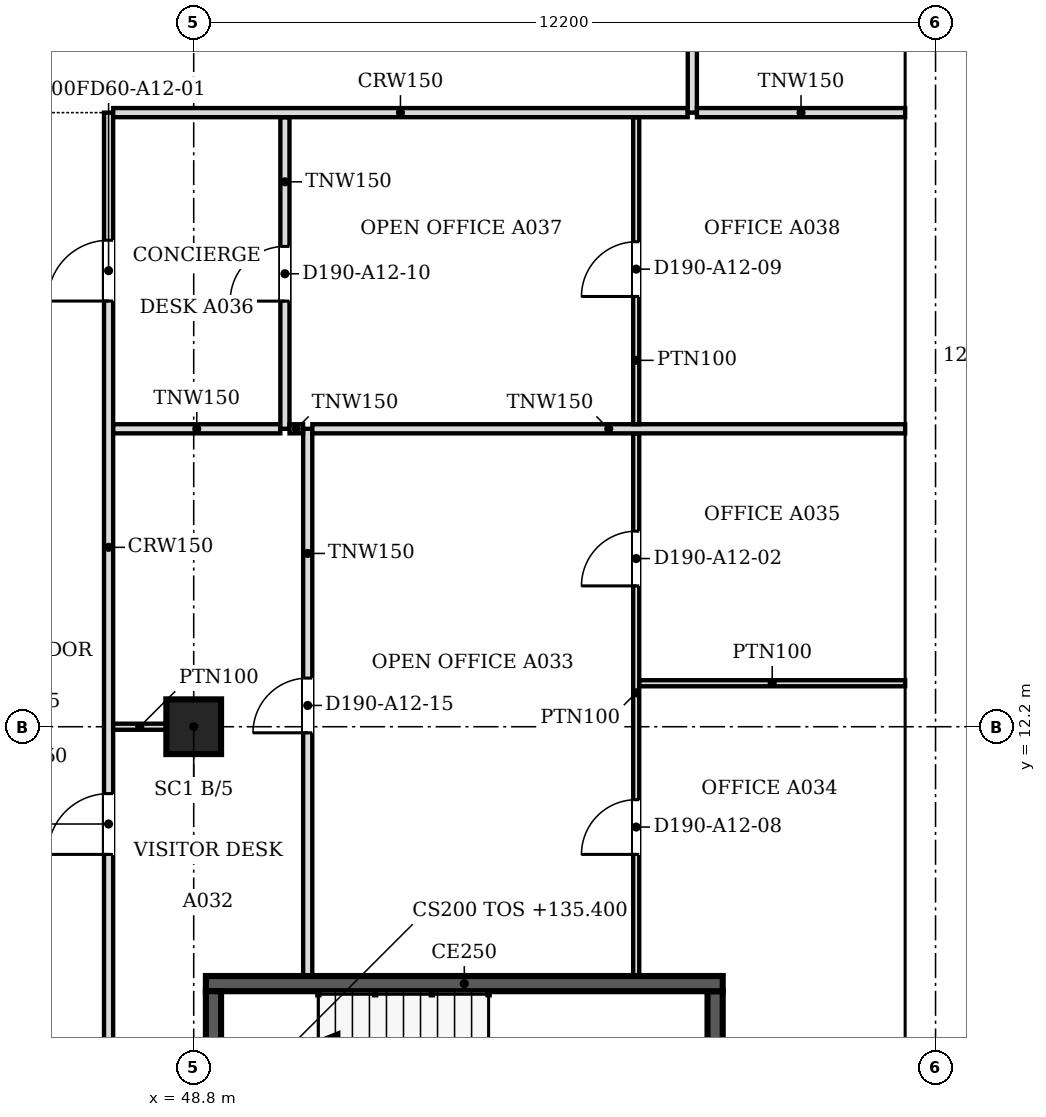
"""IFC4 building model, lengths in metres.
Left out: names, types, materials, properties, quantities, classifications, styles, units other than length and angle.
Written with IfcOpenShell. Run it as: python <this file> out.ifc"""

import sys

from ifc_helpers import new_model, si_unit, direction, frame, frame_2d, origin, origin_2d, place, context, subcontext, project, spatial, polyline, rectangle, outline, extrude, faceted_brep, source, transform, mapped, element, fill, save


model = new_model("IFC4")
c1 = context("Model", 3, precision=1e-05, world=origin(), true_north=direction((0.0, 1.0)))
c2 = subcontext(c1, "Body", "Model", "MODEL_VIEW")
j1 = project(units=[si_unit("LENGTHUNIT", "METRE"), si_unit("PLANEANGLEUNIT", "RADIAN")], contexts=[c1])
p1 = place(None, origin())
s1 = spatial("IfcSite", under=j1, at=p1, CompositionType="ELEMENT")
p2 = place(p1, origin())
s2 = spatial("IfcBuilding", under=s1, at=p2, CompositionType="ELEMENT")
p3 = place(p2, frame((0.0, 0.0, 135.4)))
s3 = spatial("IfcBuildingStorey", under=s2, at=p3, CompositionType="ELEMENT", Elevation=135.4)
p4 = place(p3, frame((48.8, 12.2, 0.0), z_axis=(0.0, 0.0, 1.0), x_axis=(1.0, 0.0, 0.0)))
e1 = element("IfcColumn", 1, at=p4, inside=s3, PredefinedType="COLUMN", context=c2, shape_type="SweptSolid", body=[
    extrude(rectangle(XDim=0.9, YDim=0.9, at=origin_2d()), origin(), (0.0, 0.0, 1.0), 3.6),
])
m1 = source(origin(), c2, "Body", "Brep", [
    faceted_brep([(3.003, -0.25, 0.0), (6.053, -0.25, 3.8), (3.003, -0.25, 7.6), (0.0, -0.25, 3.8), (0.047, 0.25, 3.859), (3.003, 0.25, 7.6), (6.053, 0.25, 3.8), (3.003, 0.25, 0.0), (0.047, 0.25, 3.741), (0.0, 0.0, 3.8)], [[[0, 1, 2, 3]], [[4, 5, 6, 7, 8]], [[7, 6, 1, 0]], [[6, 5, 2, 1]], [[5, 4, 9, 3, 2]], [[8, 7, 0, 3, 9]], [[8, 9, 4]]]),
])
p5 = place(p3, frame((60.75, 6.146, -3.8), z_axis=(0.0, 0.0, 1.0), x_axis=(0.0, 1.0, 0.0)))
e2 = element("IfcWall", 2, at=p5, inside=s3, PredefinedType="SOLIDWALL", context=c2, shape_type="MappedRepresentation", body=[
    mapped(m1, transform((0.0, 0.0, 0.0), scale=1.0)),
])
m2 = source(origin(), c2, "Body", "SweptSolid", [
    extrude(outline(polyline([(3.005, 0.401), (5.733, 3.8), (3.005, 7.199), (0.319, 3.8), (3.005, 0.401)])), frame((0.0, 0.26, 0.0), z_axis=(0.0, -1.0, 0.0), x_axis=(1.0, 0.0, 0.0)), (0.0, 0.0, 1.0), 0.52),
])
p6 = place(p5, origin())
e3 = element("IfcOpeningElement", 3, at=p6, cuts=e2, PredefinedType="OPENING", context=c2, shape_type="MappedRepresentation", body=[
    mapped(m2, transform((0.0, 0.0, 0.0), scale=1.0)),
])
m3 = source(origin(), c2, "Body", "SweptSolid", [
    extrude(outline(polyline([(3.05, 0.0), (6.1, 3.8), (3.05, 7.6), (0.0, 3.8), (3.05, 0.0)])), frame((0.0, 0.25, 0.0), z_axis=(0.0, -1.0, 0.0), x_axis=(1.0, 0.0, 0.0)), (0.0, 0.0, 1.0), 0.5),
])
p7 = place(p3, frame((60.75, 12.2, -3.8), z_axis=(0.0, 0.0, 1.0), x_axis=(0.0, 1.0, 0.0)))
e4 = element("IfcWall", 4, at=p7, inside=s3, PredefinedType="SOLIDWALL", context=c2, shape_type="MappedRepresentation", body=[
    mapped(m3, transform((0.0, 0.0, 0.0), scale=1.0)),
])
m4 = source(origin(), c2, "Body", "SweptSolid", [
    extrude(outline(polyline([(3.05, 0.399), (5.78, 3.8), (3.05, 7.2), (0.321, 3.8), (3.05, 0.399)])), frame((0.0, 0.26, 0.0), z_axis=(0.0, -1.0, 0.0), x_axis=(1.0, 0.0, 0.0)), (0.0, 0.0, 1.0), 0.52),
])
p8 = place(p7, origin())
e5 = element("IfcOpeningElement", 5, at=p8, cuts=e4, PredefinedType="OPENING", context=c2, shape_type="MappedRepresentation", body=[
    mapped(m4, transform((0.0, 0.0, 0.0), scale=1.0)),
])
m5 = source(origin(), c2, "Body", "Brep", [
    faceted_brep([(3.05, -0.25, 0.0), (6.1, -0.25, 3.8), (6.1, -0.25, 3.8), (3.05, -0.25, 7.6), (0.0, -0.25, 3.8), (0.0, 0.25, 3.8), (3.05, 0.25, 7.6), (6.1, 0.25, 3.8), (6.1, 0.25, 3.8), (3.05, 0.25, 0.0)], [[[0, 1, 2, 3, 4]], [[5, 6, 7, 8, 9]], [[9, 8, 1, 0]], [[7, 6, 3, 2]], [[6, 5, 4, 3]], [[5, 9, 0, 4]], [[1, 8, 7, 2]]]),
])
p9 = place(p3, frame((60.75, 18.3, -3.8), z_axis=(0.0, 0.0, 1.0), x_axis=(0.0, 1.0, 0.0)))
e6 = element("IfcWall", 6, at=p9, inside=s3, PredefinedType="SOLIDWALL", context=c2, shape_type="MappedRepresentation", body=[
    mapped(m5, transform((0.0, 0.0, 0.0), scale=1.0)),
])
p10 = place(p9, origin())
e7 = element("IfcOpeningElement", 7, at=p10, cuts=e6, PredefinedType="OPENING", context=c2, shape_type="MappedRepresentation", body=[
    mapped(m4, transform((0.0, 0.0, 0.0), scale=1.0)),
])
p11 = place(p2, frame((0.0, 0.0, 139.2)))
s4 = spatial("IfcBuildingStorey", under=s2, at=p11, CompositionType="ELEMENT", Elevation=139.2)
m6 = source(origin(), c2, "Body", "Brep", [
    faceted_brep([(0.047, -0.25, 0.0), (3.05, -0.25, 3.8), (0.047, -0.25, 7.6), (0.0, -0.25, 7.54), (0.0, -0.25, 0.06), (0.093, 0.25, 7.541), (3.05, 0.25, 3.8), (0.093, 0.25, 0.059), (0.047, 0.0, 0.0), (0.047, 0.0, 7.6)], [[[0, 1, 2, 3, 4]], [[5, 6, 7]], [[7, 6, 1, 0, 8]], [[6, 5, 9, 2, 1]], [[3, 2, 9]], [[8, 0, 4]], [[7, 8, 4, 3, 9, 5]]]),
])
p12 = place(p11, frame((60.75, 6.1, -3.8), z_axis=(0.0, 0.0, 1.0), x_axis=(0.0, 1.0, 0.0)))
e8 = element("IfcWall", 8, at=p12, inside=s4, PredefinedType="SOLIDWALL", context=c2, shape_type="MappedRepresentation", body=[
    mapped(m6, transform((0.0, 0.0, 0.0), scale=1.0)),
])
m7 = source(origin(), c2, "Body", "SweptSolid", [
    extrude(outline(polyline([(0.247, 0.656), (2.731, 3.8), (0.247, 6.944), (0.247, 0.656)])), frame((0.0, 0.26, 0.0), z_axis=(0.0, -1.0, 0.0), x_axis=(1.0, 0.0, 0.0)), (0.0, 0.0, 1.0), 0.52),
])
p13 = place(p12, origin())
e9 = element("IfcOpeningElement", 9, at=p13, cuts=e8, PredefinedType="OPENING", context=c2, shape_type="MappedRepresentation", body=[
    mapped(m7, transform((0.0, 0.0, 0.0), scale=1.0)),
])
m8 = source(origin(), c2, "Body", "SweptSolid", [
    extrude(outline(polyline([(3.05, 0.0), (6.1, 3.8), (3.05, 7.6), (0.0, 3.8), (3.05, 0.0)])), frame((0.0, 0.25, 0.0), z_axis=(0.0, -1.0, 0.0), x_axis=(1.0, 0.0, 0.0)), (0.0, 0.0, 1.0), 0.5),
])
p14 = place(p11, frame((60.75, 9.15, -3.8), z_axis=(0.0, 0.0, 1.0), x_axis=(0.0, 1.0, 0.0)))
e10 = element("IfcWall", 10, at=p14, inside=s4, PredefinedType="SOLIDWALL", context=c2, shape_type="MappedRepresentation", body=[
    mapped(m8, transform((0.0, 0.0, 0.0), scale=1.0)),
])
m9 = source(origin(), c2, "Body", "SweptSolid", [
    extrude(outline(polyline([(3.05, 0.399), (5.78, 3.8), (3.05, 7.201), (0.321, 3.8), (3.05, 0.399)])), frame((0.0, 0.26, 0.0), z_axis=(0.0, -1.0, 0.0), x_axis=(1.0, 0.0, 0.0)), (0.0, 0.0, 1.0), 0.52),
])
p15 = place(p14, origin())
e11 = element("IfcOpeningElement", 11, at=p15, cuts=e10, PredefinedType="OPENING", context=c2, shape_type="MappedRepresentation", body=[
    mapped(m9, transform((0.0, 0.0, 0.0), scale=1.0)),
])
p16 = place(p11, frame((60.75, 15.25, -3.8), z_axis=(0.0, 0.0, 1.0), x_axis=(0.0, 1.0, 0.0)))
e12 = element("IfcWall", 12, at=p16, inside=s4, PredefinedType="SOLIDWALL", context=c2, shape_type="MappedRepresentation", body=[
    mapped(m8, transform((0.0, 0.0, 0.0), scale=1.0)),
])
p17 = place(p16, origin())
e13 = element("IfcOpeningElement", 13, at=p17, cuts=e12, PredefinedType="OPENING", context=c2, shape_type="MappedRepresentation", body=[
    mapped(m9, transform((0.0, 0.0, 0.0), scale=1.0)),
])
m10 = source(origin(), c2, "Body", "Brep", [
    faceted_brep([(3.05, -0.25, 0.0), (6.1, -0.25, 3.8), (6.1, -0.25, 3.8), (3.05, -0.25, 7.6), (0.0, -0.25, 3.8), (0.0, 0.25, 3.8), (3.05, 0.25, 7.6), (6.1, 0.25, 3.8), (6.1, 0.25, 3.8), (3.05, 0.25, 0.0)], [[[0, 1, 2, 3, 4]], [[5, 6, 7, 8, 9]], [[9, 8, 1, 0]], [[7, 6, 3, 2]], [[6, 5, 4, 3]], [[5, 9, 0, 4]], [[1, 8, 7, 2]]]),
])
p18 = place(p11, frame((60.75, 21.35, -3.8), z_axis=(0.0, 0.0, 1.0), x_axis=(0.0, 1.0, 0.0)))
e14 = element("IfcWall", 14, at=p18, inside=s4, PredefinedType="SOLIDWALL", context=c2, shape_type="MappedRepresentation", body=[
    mapped(m10, transform((0.0, 0.0, 0.0), scale=1.0)),
])
p19 = place(p18, origin())
e15 = element("IfcOpeningElement", 15, at=p19, cuts=e14, PredefinedType="OPENING", context=c2, shape_type="MappedRepresentation", body=[
    mapped(m9, transform((0.0, 0.0, 0.0), scale=1.0)),
])
p20 = place(p3, frame((49.125, 4.45, 0.0), z_axis=(0.0, 0.0, 1.0), x_axis=(0.0, 1.0, 0.0)))
e16 = element("IfcWall", 16, at=p20, inside=s3, PredefinedType="SOLIDWALL", context=c2, shape_type="SweptSolid", body=[
    extrude(rectangle(XDim=3.4, YDim=0.25, at=frame_2d((1.7, 0.0))), origin(), (0.0, 0.0, 1.0), 3.8),
])
p21 = place(p3, frame((49.0, 7.975, 0.0), z_axis=(0.0, 0.0, 1.0), x_axis=(1.0, 0.0, 0.0)))
e17 = element("IfcWall", 17, at=p21, inside=s3, PredefinedType="SOLIDWALL", context=c2, shape_type="SweptSolid", body=[
    extrude(rectangle(XDim=8.5, YDim=0.25, at=frame_2d((4.25, 0.0))), origin(), (0.0, 0.0, 1.0), 3.8),
])
p22 = place(p3, frame((57.375, 7.85, 0.0), z_axis=(0.0, 0.0, 1.0), x_axis=(0.0, -1.0, 0.0)))
e18 = element("IfcWall", 18, at=p22, inside=s3, PredefinedType="SOLIDWALL", context=c2, shape_type="SweptSolid", body=[
    extrude(rectangle(XDim=3.4, YDim=0.25, at=frame_2d((1.7, 0.0))), origin(), (0.0, 0.0, 1.0), 3.8),
])
p23 = place(p3, frame((47.4, 22.3, 0.0), z_axis=(0.0, 0.0, 1.0), x_axis=(0.0, -1.0, 0.0)))
e19 = element("IfcWall", 19, at=p23, inside=s3, PredefinedType="PARTITIONING", context=c2, shape_type="SweptSolid", body=[
    extrude(rectangle(XDim=18.1, YDim=0.15, at=frame_2d((9.05, 0.0))), origin(), (0.0, 0.0, 1.0), 3.067),
])
m11 = source(origin(), c2, "Body", "SweptSolid", [
    extrude(rectangle(XDim=1.0, YDim=2.1, at=frame_2d((0.5, 1.05))), frame((0.0, 0.085, 0.0), z_axis=(0.0, -1.0, 0.0), x_axis=(1.0, 0.0, 0.0)), (0.0, 0.0, 1.0), 0.17),
])
p24 = place(p23, frame((2.099, 0.0, 0.0)))
e20 = element("IfcOpeningElement", 20, at=p24, cuts=e19, PredefinedType="OPENING", context=c2, shape_type="MappedRepresentation", body=[
    mapped(m11, transform((0.0, 0.0, 0.0), scale=1.0)),
])
p25 = place(p23, frame((11.2, 0.0, 0.0)))
e21 = element("IfcOpeningElement", 21, at=p25, cuts=e19, PredefinedType="OPENING", context=c2, shape_type="MappedRepresentation", body=[
    mapped(m11, transform((0.0, 0.0, 0.0), scale=1.0)),
])
p26 = place(p3, frame((50.675, 17.1, 0.0), z_axis=(0.0, 0.0, 1.0), x_axis=(0.0, -1.0, 0.0)))
e22 = element("IfcWall", 22, at=p26, inside=s3, PredefinedType="PARTITIONING", context=c2, shape_type="SweptSolid", body=[
    extrude(rectangle(XDim=9.0, YDim=0.15, at=frame_2d((4.5, 0.0))), origin(), (0.0, 0.0, 1.0), 3.067),
])
m12 = source(origin(), c2, "Body", "SweptSolid", [
    extrude(rectangle(XDim=0.9, YDim=2.1, at=frame_2d((0.45, 1.05))), frame((0.0, 0.085, 0.0), z_axis=(0.0, -1.0, 0.0), x_axis=(1.0, 0.0, 0.0)), (0.0, 0.0, 1.0), 0.17),
])
p27 = place(p26, frame((4.1, 0.0, 0.0)))
e23 = element("IfcOpeningElement", 23, at=p27, cuts=e22, PredefinedType="OPENING", context=c2, shape_type="MappedRepresentation", body=[
    mapped(m12, transform((0.0, 0.0, 0.0), scale=1.0)),
])
p28 = place(p3, frame((56.077, 17.024, 0.0), z_axis=(0.0, 0.0, 1.0), x_axis=(0.0, -1.0, 0.0)))
e24 = element("IfcWall", 24, at=p28, inside=s3, PredefinedType="PARTITIONING", context=c2, shape_type="SweptSolid", body=[
    extrude(rectangle(XDim=8.924, YDim=0.1, at=frame_2d((4.462, 0.0))), origin(), (0.0, 0.0, 1.0), 3.067),
])
m13 = source(origin(), c2, "Body", "SweptSolid", [
    extrude(rectangle(XDim=0.9, YDim=2.1, at=frame_2d((0.45, 1.05))), frame((0.0, 0.06, 0.0), z_axis=(0.0, -1.0, 0.0), x_axis=(1.0, 0.0, 0.0)), (0.0, 0.0, 1.0), 0.12),
])
p29 = place(p28, frame((1.608, 0.0, 0.0)))
e25 = element("IfcOpeningElement", 25, at=p29, cuts=e24, PredefinedType="OPENING", context=c2, shape_type="MappedRepresentation", body=[
    mapped(m13, transform((0.0, 0.0, 0.0), scale=1.0)),
])
p30 = place(p28, frame((6.024, 0.0, 0.0)))
e26 = element("IfcOpeningElement", 26, at=p30, cuts=e24, PredefinedType="OPENING", context=c2, shape_type="MappedRepresentation", body=[
    mapped(m13, transform((0.0, 0.0, 0.0), scale=1.0)),
])
p31 = place(p3, frame((48.35, 12.2, 0.0), z_axis=(0.0, 0.0, 1.0), x_axis=(-1.0, 0.0, 0.0)))
e27 = element("IfcWall", 27, at=p31, inside=s3, PredefinedType="PARTITIONING", context=c2, shape_type="SweptSolid", body=[
    extrude(rectangle(XDim=0.875, YDim=0.1, at=frame_2d((0.438, 0.0))), origin(), (0.0, 0.0, 1.0), 3.067),
])
p32 = place(p3, frame((56.128, 12.915, 0.0), z_axis=(0.0, 0.0, 1.0), x_axis=(1.0, 0.0, 0.0)))
e28 = element("IfcWall", 28, at=p32, inside=s3, PredefinedType="PARTITIONING", context=c2, shape_type="SweptSolid", body=[
    extrude(rectangle(XDim=4.372, YDim=0.1, at=frame_2d((2.186, 0.0))), origin(), (0.0, 0.0, 1.0), 3.067),
])
p33 = place(p3, frame((47.476, 17.1, 0.0), z_axis=(0.0, 0.0, 1.0), x_axis=(1.0, 0.0, 0.0)))
e29 = element("IfcWall", 29, at=p33, inside=s3, PredefinedType="PARTITIONING", context=c2, shape_type="SweptSolid", body=[
    extrude(rectangle(XDim=2.748, YDim=0.15, at=frame_2d((1.374, 0.0))), origin(), (0.0, 0.0, 1.0), 3.067),
])
p34 = place(p3, frame((50.3, 22.224, 0.0), z_axis=(0.0, 0.0, 1.0), x_axis=(0.0, -1.0, 0.0)))
e30 = element("IfcWall", 30, at=p34, inside=s3, PredefinedType="PARTITIONING", context=c2, shape_type="SweptSolid", body=[
    extrude(rectangle(XDim=5.124, YDim=0.15, at=frame_2d((2.562, 0.0))), origin(), (0.0, 0.0, 1.0), 3.067),
])
p35 = place(p34, frame((2.124, 0.0, 0.0)))
e31 = element("IfcOpeningElement", 31, at=p35, cuts=e30, PredefinedType="OPENING", context=c2, shape_type="MappedRepresentation", body=[
    mapped(m12, transform((0.0, 0.0, 0.0), scale=1.0)),
])
p36 = place(p3, frame((50.376, 17.1, 0.0), z_axis=(0.0, 0.0, 1.0), x_axis=(1.0, 0.0, 0.0)))
e32 = element("IfcWall", 32, at=p36, inside=s3, PredefinedType="PARTITIONING", context=c2, shape_type="SweptSolid", body=[
    extrude(rectangle(XDim=0.223, YDim=0.15, at=frame_2d((0.112, 0.0))), origin(), (0.0, 0.0, 1.0), 3.067),
])
p37 = place(p3, frame((50.751, 17.1, 0.0), z_axis=(0.0, 0.0, 1.0), x_axis=(1.0, 0.0, 0.0)))
e33 = element("IfcWall", 33, at=p37, inside=s3, PredefinedType="PARTITIONING", context=c2, shape_type="SweptSolid", body=[
    extrude(rectangle(XDim=9.749, YDim=0.15, at=frame_2d((4.875, 0.0))), origin(), (0.0, 0.0, 1.0), 3.067),
])
p38 = place(p3, frame((56.077, 22.224, 0.0), z_axis=(0.0, 0.0, 1.0), x_axis=(0.0, -1.0, 0.0)))
e34 = element("IfcWall", 34, at=p38, inside=s3, PredefinedType="PARTITIONING", context=c2, shape_type="SweptSolid", body=[
    extrude(rectangle(XDim=5.048, YDim=0.1, at=frame_2d((2.524, 0.0))), origin(), (0.0, 0.0, 1.0), 3.067),
])
p39 = place(p38, frame((2.048, 0.0, 0.0)))
e35 = element("IfcOpeningElement", 35, at=p39, cuts=e34, PredefinedType="OPENING", context=c2, shape_type="MappedRepresentation", body=[
    mapped(m13, transform((0.0, 0.0, 0.0), scale=1.0)),
])
p40 = place(p3, frame((47.476, 22.3, 0.0), z_axis=(0.0, 0.0, 1.0), x_axis=(1.0, 0.0, 0.0)))
e36 = element("IfcWall", 36, at=p40, inside=s3, PredefinedType="PARTITIONING", context=c2, shape_type="SweptSolid", body=[
    extrude(rectangle(XDim=9.448, YDim=0.15, at=frame_2d((4.724, 0.0))), origin(), (0.0, 0.0, 1.0), 3.067),
])
p41 = place(p3, frame((57.0, 30.6, 0.0), z_axis=(0.0, 0.0, 1.0), x_axis=(0.0, -1.0, 0.0)))
e37 = element("IfcWall", 37, at=p41, inside=s3, PredefinedType="PARTITIONING", context=c2, shape_type="SweptSolid", body=[
    extrude(rectangle(XDim=8.3, YDim=0.15, at=frame_2d((4.15, 0.0))), origin(), (0.0, 0.0, 1.0), 3.067),
])
p42 = place(p41, frame((3.7, 0.0, 0.0)))
e38 = element("IfcOpeningElement", 38, at=p42, cuts=e37, PredefinedType="OPENING", context=c2, shape_type="MappedRepresentation", body=[
    mapped(m12, transform((0.0, 0.0, 0.0), scale=1.0)),
])
p43 = place(p3, frame((57.076, 22.3, 0.0), z_axis=(0.0, 0.0, 1.0), x_axis=(1.0, 0.0, 0.0)))
e39 = element("IfcWall", 39, at=p43, inside=s3, PredefinedType="PARTITIONING", context=c2, shape_type="SweptSolid", body=[
    extrude(rectangle(XDim=3.424, YDim=0.15, at=frame_2d((1.712, 0.0))), origin(), (0.0, 0.0, 1.0), 3.067),
])
m14 = source(origin(), c2, "Body", "SweptSolid", [
    extrude(rectangle(XDim=0.9, YDim=2.1, at=frame_2d((0.45, 1.05))), frame((0.0, 0.025, 0.0), z_axis=(0.0, -1.0, 0.0), x_axis=(1.0, 0.0, 0.0)), (0.0, 0.0, 1.0), 0.05),
])
p44 = place(p29, origin())
e40 = element("IfcDoor", 40, at=p44, inside=s3, OperationType="SINGLE_SWING_RIGHT", PredefinedType="DOOR", context=c2, shape_type="MappedRepresentation", body=[
    mapped(m14, transform((0.0, 0.0, 0.0), scale=1.0)),
])
fill(e25, e40)
p45 = place(p30, origin())
e41 = element("IfcDoor", 41, at=p45, inside=s3, OperationType="SINGLE_SWING_RIGHT", PredefinedType="DOOR", context=c2, shape_type="MappedRepresentation", body=[
    mapped(m14, transform((0.0, 0.0, 0.0), scale=1.0)),
])
fill(e26, e41)
p46 = place(p39, origin())
e42 = element("IfcDoor", 42, at=p46, inside=s3, OperationType="SINGLE_SWING_RIGHT", PredefinedType="DOOR", context=c2, shape_type="MappedRepresentation", body=[
    mapped(m14, transform((0.0, 0.0, 0.0), scale=1.0)),
])
fill(e35, e42)
p47 = place(p35, origin())
e43 = element("IfcDoor", 43, at=p47, inside=s3, OperationType="SINGLE_SWING_RIGHT", PredefinedType="DOOR", context=c2, shape_type="MappedRepresentation", body=[
    mapped(m14, transform((0.0, 0.0, 0.0), scale=1.0)),
])
fill(e31, e43)
m15 = source(origin(), c2, "Body", "SweptSolid", [
    extrude(rectangle(XDim=1.0, YDim=2.1, at=frame_2d((0.5, 1.05))), frame((0.0, 0.025, 0.0), z_axis=(0.0, -1.0, 0.0), x_axis=(1.0, 0.0, 0.0)), (0.0, 0.0, 1.0), 0.05),
])
p48 = place(p24, origin())
e44 = element("IfcDoor", 44, at=p48, inside=s3, OperationType="SINGLE_SWING_RIGHT", PredefinedType="DOOR", context=c2, shape_type="MappedRepresentation", body=[
    mapped(m15, transform((0.0, 0.0, 0.0), scale=1.0)),
])
fill(e20, e44)
p49 = place(p27, origin())
e45 = element("IfcDoor", 45, at=p49, inside=s3, OperationType="SINGLE_SWING_RIGHT", PredefinedType="DOOR", context=c2, shape_type="MappedRepresentation", body=[
    mapped(m14, transform((0.0, 0.0, 0.0), scale=1.0)),
])
fill(e23, e45)
p50 = place(p25, origin())
e46 = element("IfcDoor", 46, at=p50, inside=s3, OperationType="SINGLE_SWING_RIGHT", PredefinedType="DOOR", context=c2, shape_type="MappedRepresentation", body=[
    mapped(m15, transform((0.0, 0.0, 0.0), scale=1.0)),
])
fill(e21, e46)
save(model, sys.argv[1])
